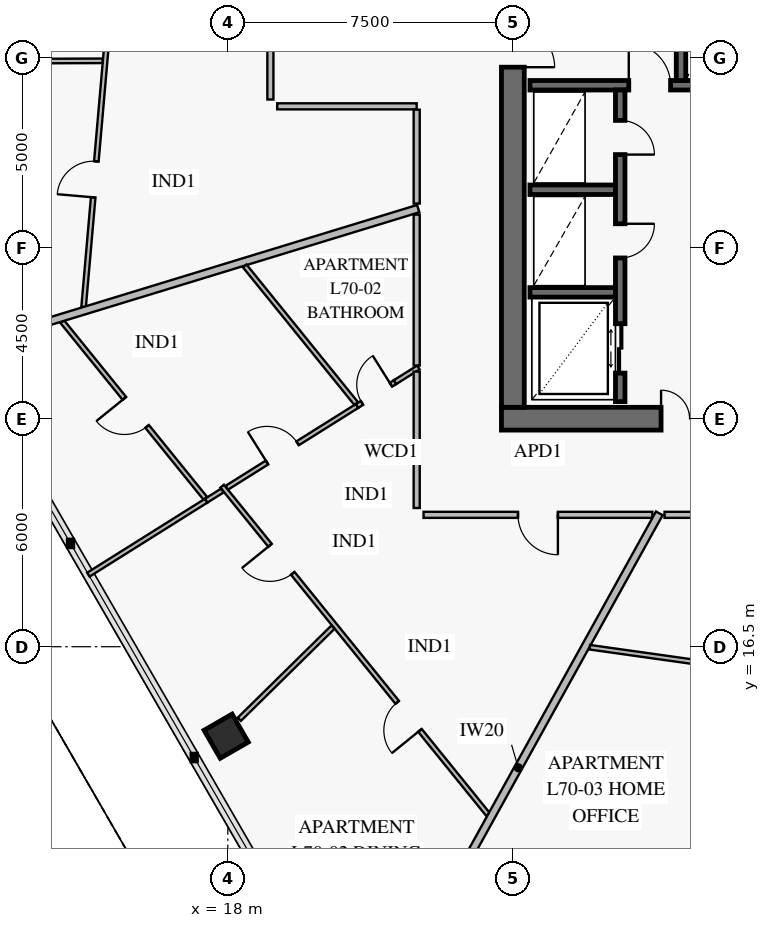
"""IFC4 building model, lengths in metres.
Left out: names, types, materials, properties, quantities, classifications, styles, units other than length and angle.
Written with IfcOpenShell. Run it as: python <this file> out.ifc"""

import sys

from ifc_helpers import new_model, si_unit, direction, frame, frame_2d, origin, origin_2d, place, context, subcontext, project, spatial, rectangle, extrude, element, fill, save


model = new_model("IFC4")
c1 = context("Model", 3, precision=1e-05, world=origin(), true_north=direction((0.0, 1.0)))
c2 = subcontext(c1, "Body", "Model", "MODEL_VIEW")
j1 = project(units=[si_unit("LENGTHUNIT", "METRE"), si_unit("PLANEANGLEUNIT", "RADIAN")], contexts=[c1])
p1 = place(None, origin())
s1 = spatial("IfcSite", under=j1, at=p1, CompositionType="ELEMENT")
p2 = place(p1, origin())
s2 = spatial("IfcBuilding", under=s1, at=p2, CompositionType="ELEMENT")
p3 = place(p2, frame((0.0, 0.0, 276.8)))
s3 = spatial("IfcBuildingStorey", under=s2, at=p3, CompositionType="ELEMENT", Elevation=276.8)
p4 = place(p3, frame((25.2, 22.5, 0.0), z_axis=(0.0, 0.0, 1.0), x_axis=(1.0, 0.0, 0.0)))
e1 = element("IfcWall", 1, at=p4, inside=s3, PredefinedType="SHEAR", context=c2, shape_type="SweptSolid", body=[
    extrude(rectangle(XDim=9.85, YDim=0.6, at=frame_2d((4.925, 0.0))), origin(), (0.0, 0.0, 1.0), 3.8),
])
p5 = place(p4, frame((4.2, 0.0, 0.0)))
e2 = element("IfcOpeningElement", 2, at=p5, cuts=e1, PredefinedType="OPENING", context=c2, shape_type="SweptSolid", body=[
    extrude(rectangle(XDim=1.5, YDim=2.15, at=frame_2d((0.75, 1.075))), frame((0.0, 0.312, 0.0), z_axis=(0.0, -1.0, 0.0), x_axis=(1.0, 0.0, 0.0)), (0.0, 0.0, 1.0), 0.624),
])
p6 = place(p3, frame((25.5, 22.8, 0.0), z_axis=(0.0, 0.0, 1.0), x_axis=(0.0, 1.0, 0.0)))
e3 = element("IfcWall", 3, at=p6, inside=s3, PredefinedType="SHEAR", context=c2, shape_type="SweptSolid", body=[
    extrude(rectangle(XDim=18.4, YDim=0.6, at=frame_2d((9.2, 0.0))), origin(), (0.0, 0.0, 1.0), 3.8),
])
p7 = place(p6, frame((8.95, 0.0, 0.0)))
e4 = element("IfcOpeningElement", 4, at=p7, cuts=e3, PredefinedType="OPENING", context=c2, shape_type="SweptSolid", body=[
    extrude(rectangle(XDim=1.1, YDim=2.15, at=frame_2d((0.55, 1.075))), frame((0.0, 0.312, 0.0), z_axis=(0.0, -1.0, 0.0), x_axis=(1.0, 0.0, 0.0)), (0.0, 0.0, 1.0), 0.624),
])
p8 = place(p3, frame((17.956, 14.145, 0.0), z_axis=(0.0, 0.0, 1.0), x_axis=(0.5, -0.866025403784, 0.0)))
e5 = element("IfcColumn", 5, at=p8, inside=s3, PredefinedType="COLUMN", context=c2, shape_type="SweptSolid", body=[
    extrude(rectangle(XDim=0.85, YDim=0.85, at=origin_2d()), origin(), (0.0, 0.0, 1.0), 3.55),
])
p9 = place(p3, frame((25.95, 31.275, 0.0), z_axis=(0.0, 0.0, 1.0), x_axis=(1.0, 0.0, 0.0)))
e6 = element("IfcWall", 6, at=p9, inside=s3, PredefinedType="SOLIDWALL", context=c2, shape_type="SweptSolid", body=[
    extrude(rectangle(XDim=20.1, YDim=0.25, at=frame_2d((10.05, 0.0))), origin(), (0.0, 0.0, 1.0), 3.8),
])
p10 = place(p9, frame((2.6, 0.0, 0.0)))
e7 = element("IfcOpeningElement", 7, at=p10, cuts=e6, PredefinedType="OPENING", context=c2, shape_type="SweptSolid", body=[
    extrude(rectangle(XDim=1.1, YDim=2.15, at=frame_2d((0.55, 1.075))), frame((0.0, 0.137, 0.0), z_axis=(0.0, -1.0, 0.0), x_axis=(1.0, 0.0, 0.0)), (0.0, 0.0, 1.0), 0.274),
])
p11 = place(p9, frame((10.6, 0.0, 0.0)))
e8 = element("IfcOpeningElement", 8, at=p11, cuts=e6, PredefinedType="OPENING", context=c2, shape_type="SweptSolid", body=[
    extrude(rectangle(XDim=1.1, YDim=2.15, at=frame_2d((0.55, 1.075))), frame((0.0, 0.137, 0.0), z_axis=(0.0, -1.0, 0.0), x_axis=(1.0, 0.0, 0.0)), (0.0, 0.0, 1.0), 0.274),
])
p12 = place(p9, frame((16.35, 0.0, 0.0)))
e9 = element("IfcOpeningElement", 9, at=p12, cuts=e6, PredefinedType="OPENING", context=c2, shape_type="SweptSolid", body=[
    extrude(rectangle(XDim=1.1, YDim=2.15, at=frame_2d((0.55, 1.075))), frame((0.0, 0.137, 0.0), z_axis=(0.0, -1.0, 0.0), x_axis=(1.0, 0.0, 0.0)), (0.0, 0.0, 1.0), 0.274),
])
p13 = place(p3, frame((29.925, 31.4, 0.0), z_axis=(0.0, 0.0, 1.0), x_axis=(0.0, 1.0, 0.0)))
e10 = element("IfcWall", 10, at=p13, inside=s3, PredefinedType="SOLIDWALL", context=c2, shape_type="SweptSolid", body=[
    extrude(rectangle(XDim=9.7, YDim=0.25, at=frame_2d((4.85, 0.0))), origin(), (0.0, 0.0, 1.0), 3.8),
])
for number, where, z_axis, x_axis in (
    (11, (25.95, 25.825, 0.0), (0.0, 0.0, 1.0), (1.0, 0.0, 0.0)),
    (12, (25.95, 28.525, 0.0), (0.0, 0.0, 1.0), (1.0, 0.0, 0.0)),
):
    element("IfcWall", number, at=place(p3, frame(where, z_axis=z_axis, x_axis=x_axis)), inside=s3, PredefinedType="SOLIDWALL", context=c2, shape_type="SweptSolid", body=[
        extrude(rectangle(XDim=2.25, YDim=0.25, at=frame_2d((1.125, 0.0))), origin(), (0.0, 0.0, 1.0), 3.8),
    ])
p14 = place(p3, frame((28.325, 22.95, 0.0), z_axis=(0.0, 0.0, 1.0), x_axis=(0.0, 1.0, 0.0)))
e13 = element("IfcWall", 13, at=p14, inside=s3, PredefinedType="SOLIDWALL", context=c2, shape_type="SweptSolid", body=[
    extrude(rectangle(XDim=8.2, YDim=0.25, at=frame_2d((4.1, 0.0))), origin(), (0.0, 0.0, 1.0), 3.8),
])
p15 = place(p14, frame((0.75, 0.0, 0.0)))
e14 = element("IfcOpeningElement", 14, at=p15, cuts=e13, PredefinedType="OPENING", context=c2, shape_type="SweptSolid", body=[
    extrude(rectangle(XDim=1.3, YDim=2.3, at=frame_2d((0.65, 1.15))), frame((0.0, 0.137, 0.0), z_axis=(0.0, -1.0, 0.0), x_axis=(1.0, 0.0, 0.0)), (0.0, 0.0, 1.0), 0.274),
])
p16 = place(p14, frame((3.78, 0.0, 0.0)))
e15 = element("IfcOpeningElement", 15, at=p16, cuts=e13, PredefinedType="OPENING", context=c2, shape_type="SweptSolid", body=[
    extrude(rectangle(XDim=0.9, YDim=2.1, at=frame_2d((0.45, 1.05))), frame((0.0, 0.137, 0.0), z_axis=(0.0, -1.0, 0.0), x_axis=(1.0, 0.0, 0.0)), (0.0, 0.0, 1.0), 0.274),
])
p17 = place(p14, frame((6.5, 0.0, 0.0)))
e16 = element("IfcOpeningElement", 16, at=p17, cuts=e13, PredefinedType="OPENING", context=c2, shape_type="SweptSolid", body=[
    extrude(rectangle(XDim=0.9, YDim=2.1, at=frame_2d((0.45, 1.05))), frame((0.0, 0.137, 0.0), z_axis=(0.0, -1.0, 0.0), x_axis=(1.0, 0.0, 0.0)), (0.0, 0.0, 1.0), 0.274),
])
p18 = place(p3, frame((15.115, 35.844, 0.0), z_axis=(0.0, 0.0, 1.0), x_axis=(-0.087167240255, -0.996193692123, 0.0)))
e17 = element("IfcWall", 17, at=p18, inside=s3, PredefinedType="PARTITIONING", context=c2, shape_type="SweptSolid", body=[
    extrude(rectangle(XDim=10.444, YDim=0.12, at=frame_2d((5.222, 0.0))), origin(), (0.0, 0.0, 1.0), 2.95),
])
p19 = place(p18, frame((1.616, 0.0, 0.0)))
e18 = element("IfcOpeningElement", 18, at=p19, cuts=e17, PredefinedType="OPENING", context=c2, shape_type="SweptSolid", body=[
    extrude(rectangle(XDim=0.95, YDim=2.1, at=frame_2d((0.475, 1.05))), frame((0.0, 0.072, 0.0), z_axis=(0.0, -1.0, 0.0), x_axis=(1.0, 0.0, 0.0)), (0.0, 0.0, 1.0), 0.144),
])
p20 = place(p18, frame((6.598, 0.0, 0.0)))
e19 = element("IfcOpeningElement", 19, at=p20, cuts=e17, PredefinedType="OPENING", context=c2, shape_type="SweptSolid", body=[
    extrude(rectangle(XDim=0.95, YDim=2.1, at=frame_2d((0.475, 1.05))), frame((0.0, 0.072, 0.0), z_axis=(0.0, -1.0, 0.0), x_axis=(1.0, 0.0, 0.0)), (0.0, 0.0, 1.0), 0.144),
])
p21 = place(p3, frame((17.851, 20.725, 0.0), z_axis=(0.0, 0.0, 1.0), x_axis=(0.629311937349, -0.777152807053, 0.0)))
e20 = element("IfcWall", 20, at=p21, inside=s3, PredefinedType="PARTITIONING", context=c2, shape_type="SweptSolid", body=[
    extrude(rectangle(XDim=11.117, YDim=0.12, at=frame_2d((5.559, 0.0))), origin(), (0.0, 0.0, 1.0), 2.95),
])
p22 = place(p21, frame((2.001, 0.0, 0.0)))
e21 = element("IfcOpeningElement", 21, at=p22, cuts=e20, PredefinedType="OPENING", context=c2, shape_type="SweptSolid", body=[
    extrude(rectangle(XDim=0.95, YDim=2.1, at=frame_2d((0.475, 1.05))), frame((0.0, 0.072, 0.0), z_axis=(0.0, -1.0, 0.0), x_axis=(1.0, 0.0, 0.0)), (0.0, 0.0, 1.0), 0.144),
])
p23 = place(p21, frame((7.319, 0.0, 0.0)))
e22 = element("IfcOpeningElement", 22, at=p23, cuts=e20, PredefinedType="OPENING", context=c2, shape_type="SweptSolid", body=[
    extrude(rectangle(XDim=0.95, YDim=2.1, at=frame_2d((0.475, 1.05))), frame((0.0, 0.072, 0.0), z_axis=(0.0, -1.0, 0.0), x_axis=(1.0, 0.0, 0.0)), (0.0, 0.0, 1.0), 0.144),
])
p24 = place(p3, frame((22.4, 23.462, 0.0), z_axis=(0.0, 0.0, 1.0), x_axis=(-0.846918091409, -0.531723373987, 0.0)))
e23 = element("IfcWall", 23, at=p24, inside=s3, PredefinedType="PARTITIONING", context=c2, shape_type="SweptSolid", body=[
    extrude(rectangle(XDim=1.183, YDim=0.12, at=frame_2d((0.591, 0.0))), origin(), (0.0, 0.0, 1.0), 3.55),
])
p25 = place(p24, frame((0.127, 0.0, 0.0)))
e24 = element("IfcOpeningElement", 24, at=p25, cuts=e23, PredefinedType="OPENING", context=c2, shape_type="SweptSolid", body=[
    extrude(rectangle(XDim=0.9, YDim=2.1, at=frame_2d((0.45, 1.05))), frame((0.0, 0.072, 0.0), z_axis=(0.0, -1.0, 0.0), x_axis=(1.0, 0.0, 0.0)), (0.0, 0.0, 1.0), 0.144),
])
p26 = place(p3, frame((21.398, 22.833, 0.0), z_axis=(0.0, 0.0, 1.0), x_axis=(-0.84692159597, -0.531717791953, 0.0)))
e25 = element("IfcWall", 25, at=p26, inside=s3, PredefinedType="PARTITIONING", context=c2, shape_type="SweptSolid", body=[
    extrude(rectangle(XDim=4.045, YDim=0.12, at=frame_2d((2.022, 0.0))), origin(), (0.0, 0.0, 1.0), 3.15),
])
p27 = place(p26, frame((1.844, 0.0, 0.0)))
e26 = element("IfcOpeningElement", 26, at=p27, cuts=e25, PredefinedType="OPENING", context=c2, shape_type="SweptSolid", body=[
    extrude(rectangle(XDim=0.95, YDim=2.1, at=frame_2d((0.475, 1.05))), frame((0.0, 0.072, 0.0), z_axis=(0.0, -1.0, 0.0), x_axis=(1.0, 0.0, 0.0)), (0.0, 0.0, 1.0), 0.144),
])
p28 = place(p3, frame((17.857, 20.61, 0.0), z_axis=(0.0, 0.0, 1.0), x_axis=(-0.847021311188, -0.531558932192, 0.0)))
e27 = element("IfcWall", 27, at=p28, inside=s3, PredefinedType="PARTITIONING", context=c2, shape_type="SweptSolid", body=[
    extrude(rectangle(XDim=0.506, YDim=0.12, at=frame_2d((0.253, 0.0))), origin(), (0.0, 0.0, 1.0), 3.55),
])
p29 = place(p3, frame((13.642, 25.055, 0.0), z_axis=(0.0, 0.0, 1.0), x_axis=(0.629353217971, -0.777119377593, 0.0)))
e28 = element("IfcWall", 28, at=p29, inside=s3, PredefinedType="PARTITIONING", context=c2, shape_type="SweptSolid", body=[
    extrude(rectangle(XDim=5.981, YDim=0.12, at=frame_2d((2.99, 0.0))), origin(), (0.0, 0.0, 1.0), 3.55),
])
p30 = place(p29, frame((2.6, 0.0, 0.0)))
e29 = element("IfcOpeningElement", 29, at=p30, cuts=e28, PredefinedType="OPENING", context=c2, shape_type="SweptSolid", body=[
    extrude(rectangle(XDim=0.95, YDim=2.1, at=frame_2d((0.475, 1.05))), frame((0.0, 0.072, 0.0), z_axis=(0.0, -1.0, 0.0), x_axis=(1.0, 0.0, 0.0)), (0.0, 0.0, 1.0), 0.144),
])
p31 = place(p3, frame((23.15, 19.97, 0.0), z_axis=(0.0, 0.0, 1.0), x_axis=(1.0, 0.0, 0.0)))
e30 = element("IfcWall", 30, at=p31, inside=s3, PredefinedType="PARTITIONING", context=c2, shape_type="SweptSolid", body=[
    extrude(rectangle(XDim=6.021, YDim=0.16, at=frame_2d((3.01, 0.0))), origin(), (0.0, 0.0, 1.0), 2.95),
])
p32 = place(p31, frame((2.485, 0.0, 0.0)))
e31 = element("IfcOpeningElement", 31, at=p32, cuts=e30, PredefinedType="OPENING", context=c2, shape_type="SweptSolid", body=[
    extrude(rectangle(XDim=1.05, YDim=2.15, at=frame_2d((0.525, 1.075))), frame((0.0, 0.092, 0.0), z_axis=(0.0, -1.0, 0.0), x_axis=(1.0, 0.0, 0.0)), (0.0, 0.0, 1.0), 0.184),
])
p33 = place(p3, frame((14.704, 31.918, 0.0), z_axis=(0.0, 0.0, 1.0), x_axis=(-0.99999260876, -0.003844792105, 0.0)))
e32 = element("IfcWall", 32, at=p33, inside=s3, PredefinedType="PARTITIONING", context=c2, shape_type="SweptSolid", body=[
    extrude(rectangle(XDim=7.747, YDim=0.12, at=frame_2d((3.874, 0.0))), origin(), (0.0, 0.0, 1.0), 2.93),
])
p34 = place(p3, frame((23.01, 28.029, 0.0), z_axis=(0.0, 0.0, 1.0), x_axis=(-0.956304823796, -0.292371482852, 0.0)))
e33 = element("IfcWall", 33, at=p34, inside=s3, PredefinedType="PARTITIONING", context=c2, shape_type="SweptSolid", body=[
    extrude(rectangle(XDim=12.652, YDim=0.2, at=frame_2d((6.326, 0.0))), origin(), (0.0, 0.0, 1.0), 2.93),
])
p35 = place(p3, frame((20.768, 17.015, 0.0), z_axis=(0.0, 0.0, 1.0), x_axis=(-0.71287305113, -0.701293100617, 0.0)))
e34 = element("IfcWall", 34, at=p35, inside=s3, PredefinedType="PARTITIONING", context=c2, shape_type="SweptSolid", body=[
    extrude(rectangle(XDim=3.458, YDim=0.12, at=frame_2d((1.729, 0.0))), origin(), (0.0, 0.0, 1.0), 2.95),
])
p36 = place(p3, frame((23.015, 23.848, 0.0), z_axis=(0.0, 0.0, 1.0), x_axis=(-0.846995618637, -0.531599870212, 0.0)))
e35 = element("IfcWall", 35, at=p36, inside=s3, PredefinedType="PARTITIONING", context=c2, shape_type="SweptSolid", body=[
    extrude(rectangle(XDim=0.726, YDim=0.12, at=frame_2d((0.363, 0.0))), origin(), (0.0, 0.0, 1.0), 3.55),
])
p37 = place(p3, frame((17.428, 20.341, 0.0), z_axis=(0.0, 0.0, 1.0), x_axis=(-0.846935423542, -0.531695766722, 0.0)))
e36 = element("IfcWall", 36, at=p37, inside=s3, PredefinedType="PARTITIONING", context=c2, shape_type="SweptSolid", body=[
    extrude(rectangle(XDim=3.658, YDim=0.12, at=frame_2d((1.829, 0.0))), origin(), (0.0, 0.0, 1.0), 2.93),
])
p38 = place(p3, frame((18.445, 26.52, 0.0), z_axis=(0.0, 0.0, 1.0), x_axis=(0.629305271461, -0.777158204815, 0.0)))
e37 = element("IfcWall", 37, at=p38, inside=s3, PredefinedType="PARTITIONING", context=c2, shape_type="SweptSolid", body=[
    extrude(rectangle(XDim=4.658, YDim=0.12, at=frame_2d((2.329, 0.0))), origin(), (0.0, 0.0, 1.0), 3.55),
])
p39 = place(p3, frame((29.354, 20.01, 0.0), z_axis=(0.0, 0.0, 1.0), x_axis=(-0.48480997026, -0.874619513124, 0.0)))
e38 = element("IfcWall", 38, at=p39, inside=s3, PredefinedType="PARTITIONING", context=c2, shape_type="SweptSolid", body=[
    extrude(rectangle(XDim=15.309, YDim=0.2, at=frame_2d((7.654, 0.0))), origin(), (0.0, 0.0, 1.0), 2.93),
])
p40 = place(p3, frame((27.524, 16.486, 0.0), z_axis=(0.0, 0.0, 1.0), x_axis=(0.990277311459, -0.139107319759, 0.0)))
e39 = element("IfcWall", 39, at=p40, inside=s3, PredefinedType="PARTITIONING", context=c2, shape_type="SweptSolid", body=[
    extrude(rectangle(XDim=4.742, YDim=0.12, at=frame_2d((2.371, 0.0))), origin(), (0.0, 0.0, 1.0), 2.95),
])
p41 = place(p3, frame((19.3, 30.72, 0.0), z_axis=(0.0, 0.0, 1.0), x_axis=(1.0, 0.0, 0.0)))
e40 = element("IfcWall", 40, at=p41, inside=s3, PredefinedType="PARTITIONING", context=c2, shape_type="SweptSolid", body=[
    extrude(rectangle(XDim=3.67, YDim=0.16, at=frame_2d((1.835, 0.0))), origin(), (0.0, 0.0, 1.0), 3.55),
])
p42 = place(p3, frame((22.97, 30.632, 0.0), z_axis=(0.0, 0.0, 1.0), x_axis=(0.0, -1.0, 0.0)))
e41 = element("IfcWall", 41, at=p42, inside=s3, PredefinedType="PARTITIONING", context=c2, shape_type="SweptSolid", body=[
    extrude(rectangle(XDim=2.471, YDim=0.16, at=frame_2d((1.235, 0.0))), origin(), (0.0, 0.0, 1.0), 2.95),
])
p43 = place(p3, frame((19.12, 33.1, 0.0), z_axis=(0.0, 0.0, 1.0), x_axis=(0.0, -1.0, 0.0)))
e42 = element("IfcWall", 42, at=p43, inside=s3, PredefinedType="PARTITIONING", context=c2, shape_type="SweptSolid", body=[
    extrude(rectangle(XDim=2.2, YDim=0.16, at=frame_2d((1.1, 0.0))), origin(), (0.0, 0.0, 1.0), 3.55),
])
p44 = place(p3, frame((22.97, 23.74, 0.0), z_axis=(0.0, 0.0, 1.0), x_axis=(0.0, -1.0, 0.0)))
e43 = element("IfcWall", 43, at=p44, inside=s3, PredefinedType="PARTITIONING", context=c2, shape_type="SweptSolid", body=[
    extrude(rectangle(XDim=3.59, YDim=0.16, at=frame_2d((1.795, 0.0))), origin(), (0.0, 0.0, 1.0), 3.55),
])
p45 = place(p3, frame((22.97, 27.871, 0.0), z_axis=(0.0, 0.0, 1.0), x_axis=(0.0, -1.0, 0.0)))
e44 = element("IfcWall", 44, at=p45, inside=s3, PredefinedType="PARTITIONING", context=c2, shape_type="SweptSolid", body=[
    extrude(rectangle(XDim=3.97, YDim=0.16, at=frame_2d((1.985, 0.0))), origin(), (0.0, 0.0, 1.0), 3.55),
])
p46 = place(p3, frame((29.491, 19.97, 0.0), z_axis=(0.0, 0.0, 1.0), x_axis=(1.0, 0.0, 0.0)))
e45 = element("IfcWall", 45, at=p46, inside=s3, PredefinedType="PARTITIONING", context=c2, shape_type="SweptSolid", body=[
    extrude(rectangle(XDim=3.68, YDim=0.16, at=frame_2d((1.84, 0.0))), origin(), (0.0, 0.0, 1.0), 2.95),
])
p47 = place(p7, frame((1.1, 0.0, 0.0), z_axis=(0.0, 0.0, 1.0), x_axis=(-1.0, 0.0, 0.0)))
e46 = element("IfcDoor", 46, at=p47, inside=s3, OperationType="SINGLE_SWING_RIGHT", PredefinedType="USERDEFINED", context=c2, shape_type="SweptSolid", body=[
    extrude(rectangle(XDim=1.1, YDim=2.15, at=frame_2d((0.55, 1.075))), frame((0.0, 0.025, 0.0), z_axis=(0.0, -1.0, 0.0), x_axis=(1.0, 0.0, 0.0)), (0.0, 0.0, 1.0), 0.05),
])
fill(e4, e46)
p48 = place(p5, origin())
e47 = element("IfcDoor", 47, at=p48, inside=s3, OperationType="DOUBLE_DOOR_SINGLE_SWING", PredefinedType="DOOR", context=c2, shape_type="SweptSolid", body=[
    extrude(rectangle(XDim=1.5, YDim=2.15, at=frame_2d((0.75, 1.075))), frame((0.0, 0.025, 0.0), z_axis=(0.0, -1.0, 0.0), x_axis=(1.0, 0.0, 0.0)), (0.0, 0.0, 1.0), 0.05),
])
fill(e2, e47)
p49 = place(p10, origin())
e48 = element("IfcDoor", 48, at=p49, inside=s3, OperationType="SINGLE_SWING_LEFT", PredefinedType="USERDEFINED", context=c2, shape_type="SweptSolid", body=[
    extrude(rectangle(XDim=1.1, YDim=2.15, at=frame_2d((0.55, 1.075))), frame((0.0, 0.025, 0.0), z_axis=(0.0, -1.0, 0.0), x_axis=(1.0, 0.0, 0.0)), (0.0, 0.0, 1.0), 0.05),
])
fill(e7, e48)
p50 = place(p15, frame((1.3, 0.0, 0.0), z_axis=(0.0, 0.0, 1.0), x_axis=(-1.0, 0.0, 0.0)))
e49 = element("IfcDoor", 49, at=p50, inside=s3, OperationType="DOUBLE_DOOR_SLIDING", PredefinedType="DOOR", context=c2, shape_type="SweptSolid", body=[
    extrude(rectangle(XDim=1.3, YDim=2.3, at=frame_2d((0.65, 1.15))), frame((0.0, 0.025, 0.0), z_axis=(0.0, -1.0, 0.0), x_axis=(1.0, 0.0, 0.0)), (0.0, 0.0, 1.0), 0.05),
])
fill(e14, e49)
p51 = place(p16, frame((0.9, 0.0, 0.0), z_axis=(0.0, 0.0, 1.0), x_axis=(-1.0, 0.0, 0.0)))
e50 = element("IfcDoor", 50, at=p51, inside=s3, OperationType="SINGLE_SWING_LEFT", PredefinedType="DOOR", context=c2, shape_type="SweptSolid", body=[
    extrude(rectangle(XDim=0.9, YDim=2.1, at=frame_2d((0.45, 1.05))), frame((0.0, 0.025, 0.0), z_axis=(0.0, -1.0, 0.0), x_axis=(1.0, 0.0, 0.0)), (0.0, 0.0, 1.0), 0.05),
])
fill(e15, e50)
p52 = place(p17, frame((0.9, 0.0, 0.0), z_axis=(0.0, 0.0, 1.0), x_axis=(-1.0, 0.0, 0.0)))
e51 = element("IfcDoor", 51, at=p52, inside=s3, OperationType="SINGLE_SWING_RIGHT", PredefinedType="DOOR", context=c2, shape_type="SweptSolid", body=[
    extrude(rectangle(XDim=0.9, YDim=2.1, at=frame_2d((0.45, 1.05))), frame((0.0, 0.025, 0.0), z_axis=(0.0, -1.0, 0.0), x_axis=(1.0, 0.0, 0.0)), (0.0, 0.0, 1.0), 0.05),
])
fill(e16, e51)
p53 = place(p20, frame((0.95, 0.0, 0.0), z_axis=(0.0, 0.0, 1.0), x_axis=(-1.0, 0.0, 0.0)))
e52 = element("IfcDoor", 52, at=p53, inside=s3, OperationType="SINGLE_SWING_LEFT", PredefinedType="DOOR", context=c2, shape_type="SweptSolid", body=[
    extrude(rectangle(XDim=0.95, YDim=2.1, at=frame_2d((0.475, 1.05))), frame((0.0, 0.025, 0.0), z_axis=(0.0, -1.0, 0.0), x_axis=(1.0, 0.0, 0.0)), (0.0, 0.0, 1.0), 0.05),
])
fill(e19, e52)
p54 = place(p22, frame((0.95, 0.0, 0.0), z_axis=(0.0, 0.0, 1.0), x_axis=(-1.0, 0.0, 0.0)))
e53 = element("IfcDoor", 53, at=p54, inside=s3, OperationType="SINGLE_SWING_RIGHT", PredefinedType="DOOR", context=c2, shape_type="SweptSolid", body=[
    extrude(rectangle(XDim=0.95, YDim=2.1, at=frame_2d((0.475, 1.05))), frame((0.0, 0.025, 0.0), z_axis=(0.0, -1.0, 0.0), x_axis=(1.0, 0.0, 0.0)), (0.0, 0.0, 1.0), 0.05),
])
fill(e21, e53)
p55 = place(p23, frame((0.95, 0.0, 0.0), z_axis=(0.0, 0.0, 1.0), x_axis=(-1.0, 0.0, 0.0)))
e54 = element("IfcDoor", 54, at=p55, inside=s3, OperationType="SINGLE_SWING_LEFT", PredefinedType="DOOR", context=c2, shape_type="SweptSolid", body=[
    extrude(rectangle(XDim=0.95, YDim=2.1, at=frame_2d((0.475, 1.05))), frame((0.0, 0.025, 0.0), z_axis=(0.0, -1.0, 0.0), x_axis=(1.0, 0.0, 0.0)), (0.0, 0.0, 1.0), 0.05),
])
fill(e22, e54)
p56 = place(p25, frame((0.9, 0.0, 0.0), z_axis=(0.0, 0.0, 1.0), x_axis=(-1.0, 0.0, 0.0)))
e55 = element("IfcDoor", 55, at=p56, inside=s3, OperationType="SINGLE_SWING_RIGHT", PredefinedType="DOOR", context=c2, shape_type="SweptSolid", body=[
    extrude(rectangle(XDim=0.9, YDim=2.1, at=frame_2d((0.45, 1.05))), frame((0.0, 0.025, 0.0), z_axis=(0.0, -1.0, 0.0), x_axis=(1.0, 0.0, 0.0)), (0.0, 0.0, 1.0), 0.05),
])
fill(e24, e55)
p57 = place(p27, frame((0.95, 0.0, 0.0), z_axis=(0.0, 0.0, 1.0), x_axis=(-1.0, 0.0, 0.0)))
e56 = element("IfcDoor", 56, at=p57, inside=s3, OperationType="SINGLE_SWING_LEFT", PredefinedType="DOOR", context=c2, shape_type="SweptSolid", body=[
    extrude(rectangle(XDim=0.95, YDim=2.1, at=frame_2d((0.475, 1.05))), frame((0.0, 0.025, 0.0), z_axis=(0.0, -1.0, 0.0), x_axis=(1.0, 0.0, 0.0)), (0.0, 0.0, 1.0), 0.05),
])
fill(e26, e56)
p58 = place(p30, frame((0.95, 0.0, 0.0), z_axis=(0.0, 0.0, 1.0), x_axis=(-1.0, 0.0, 0.0)))
e57 = element("IfcDoor", 57, at=p58, inside=s3, OperationType="SINGLE_SWING_RIGHT", PredefinedType="DOOR", context=c2, shape_type="SweptSolid", body=[
    extrude(rectangle(XDim=0.95, YDim=2.1, at=frame_2d((0.475, 1.05))), frame((0.0, 0.025, 0.0), z_axis=(0.0, -1.0, 0.0), x_axis=(1.0, 0.0, 0.0)), (0.0, 0.0, 1.0), 0.05),
])
fill(e29, e57)
p59 = place(p32, frame((1.05, 0.0, 0.0), z_axis=(0.0, 0.0, 1.0), x_axis=(-1.0, 0.0, 0.0)))
e58 = element("IfcDoor", 58, at=p59, inside=s3, OperationType="SINGLE_SWING_LEFT", PredefinedType="DOOR", context=c2, shape_type="SweptSolid", body=[
    extrude(rectangle(XDim=1.05, YDim=2.15, at=frame_2d((0.525, 1.075))), frame((0.0, 0.025, 0.0), z_axis=(0.0, -1.0, 0.0), x_axis=(1.0, 0.0, 0.0)), (0.0, 0.0, 1.0), 0.05),
])
fill(e31, e58)
save(model, sys.argv[1])
